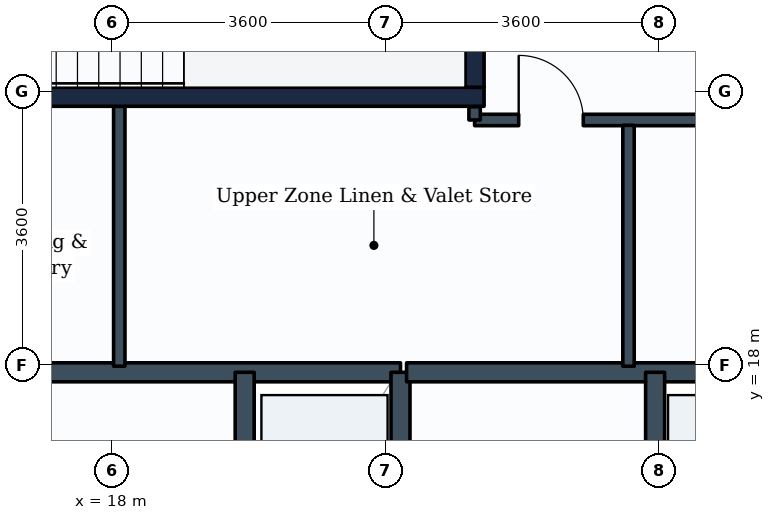
"""IFC4 building model, lengths in metres.
Left out: names, types, materials, properties, quantities, classifications, styles, units other than length and angle.
Written with IfcOpenShell. Run it as: python <this file> out.ifc"""

import sys

from ifc_helpers import new_model, si_unit, direction, frame, frame_2d, origin, place, context, subcontext, project, spatial, rectangle, extrude, element, fill, save


model = new_model("IFC4")
c1 = context("Model", 3, precision=1e-05, world=origin(), true_north=direction((0.0, 1.0)))
c2 = subcontext(c1, "Body", "Model", "MODEL_VIEW")
j1 = project(units=[si_unit("LENGTHUNIT", "METRE"), si_unit("PLANEANGLEUNIT", "RADIAN")], contexts=[c1])
p1 = place(None, origin())
s1 = spatial("IfcSite", under=j1, at=p1, CompositionType="ELEMENT")
p2 = place(p1, origin())
s2 = spatial("IfcBuilding", under=s1, at=p2, CompositionType="ELEMENT")
p3 = place(p2, frame((0.0, 0.0, 217.4)))
s3 = spatial("IfcBuildingStorey", under=s2, at=p3, CompositionType="ELEMENT", Elevation=217.4)
p4 = place(p3, frame((14.65, 21.525, 0.0), z_axis=(0.0, 0.0, 1.0), x_axis=(1.0, 0.0, 0.0)))
e1 = element("IfcWall", 1, at=p4, inside=s3, PredefinedType="SHEAR", context=c2, shape_type="SweptSolid", body=[
    extrude(rectangle(XDim=8.25, YDim=0.25, at=frame_2d((4.125, 0.0))), origin(), (0.0, 0.0, 1.0), 3.28),
])
p5 = place(p3, frame((22.775, 21.65, 0.0), z_axis=(0.0, 0.0, 1.0), x_axis=(0.0, 1.0, 0.0)))
e2 = element("IfcWall", 2, at=p5, inside=s3, PredefinedType="SHEAR", context=c2, shape_type="SweptSolid", body=[
    extrude(rectangle(XDim=2.84, YDim=0.25, at=frame_2d((1.42, 0.0))), origin(), (0.0, 0.0, 1.0), 3.28),
])
p6 = place(p3, frame((14.65, 17.9, 0.0), z_axis=(0.0, 0.0, 1.0), x_axis=(1.0, 0.0, 0.0)))
e3 = element("IfcWall", 3, at=p6, inside=s3, PredefinedType="PARTITIONING", context=c2, shape_type="SweptSolid", body=[
    extrude(rectangle(XDim=7.15, YDim=0.25, at=frame_2d((3.575, 0.0))), origin(), (0.0, 0.0, 1.0), 3.265),
])
p7 = place(p3, frame((19.75, 14.84, 0.0), z_axis=(0.0, 0.0, 1.0), x_axis=(0.0, 1.0, 0.0)))
e4 = element("IfcWall", 4, at=p7, inside=s3, PredefinedType="PARTITIONING", context=c2, shape_type="SweptSolid", body=[
    extrude(rectangle(XDim=3.06, YDim=0.25, at=frame_2d((1.53, 0.0))), origin(), (0.0, 0.0, 1.0), 3.265),
])
p8 = place(p7, frame((0.98, 0.0, 0.0)))
e5 = element("IfcOpeningElement", 5, at=p8, cuts=e4, PredefinedType="OPENING", context=c2, shape_type="SweptSolid", body=[
    extrude(rectangle(XDim=1.1, YDim=2.1, at=frame_2d((0.55, 1.05))), frame((0.0, 0.135, 0.0), z_axis=(0.0, -1.0, 0.0), x_axis=(1.0, 0.0, 0.0)), (0.0, 0.0, 1.0), 0.27),
])
p9 = place(p3, frame((21.8, 14.84, 0.0), z_axis=(0.0, 0.0, 1.0), x_axis=(0.0, 1.0, 0.0)))
e6 = element("IfcWall", 6, at=p9, inside=s3, PredefinedType="PARTITIONING", context=c2, shape_type="SweptSolid", body=[
    extrude(rectangle(XDim=3.06, YDim=0.25, at=frame_2d((1.53, 0.0))), origin(), (0.0, 0.0, 1.0), 3.265),
])
p10 = place(p3, frame((21.88, 17.9, 0.0), z_axis=(0.0, 0.0, 1.0), x_axis=(1.0, 0.0, 0.0)))
e7 = element("IfcWall", 7, at=p10, inside=s3, PredefinedType="PARTITIONING", context=c2, shape_type="SweptSolid", body=[
    extrude(rectangle(XDim=8.52, YDim=0.25, at=frame_2d((4.26, 0.0))), origin(), (0.0, 0.0, 1.0), 3.265),
])
p11 = place(p3, frame((25.15, 14.84, 0.0), z_axis=(0.0, 0.0, 1.0), x_axis=(0.0, 1.0, 0.0)))
e8 = element("IfcWall", 8, at=p11, inside=s3, PredefinedType="PARTITIONING", context=c2, shape_type="SweptSolid", body=[
    extrude(rectangle(XDim=3.06, YDim=0.25, at=frame_2d((1.53, 0.0))), origin(), (0.0, 0.0, 1.0), 3.265),
])
p12 = place(p3, frame((22.775, 21.22, 0.0), z_axis=(0.0, 0.0, 1.0), x_axis=(1.0, 0.0, 0.0)))
e9 = element("IfcWall", 9, at=p12, inside=s3, PredefinedType="PARTITIONING", context=c2, shape_type="SweptSolid", body=[
    extrude(rectangle(XDim=7.545, YDim=0.15, at=frame_2d((3.772, 0.0))), origin(), (0.0, 0.0, 1.0), 3.265),
])
p13 = place(p12, frame((0.58, 0.0, 0.0)))
e10 = element("IfcOpeningElement", 10, at=p13, cuts=e9, PredefinedType="OPENING", context=c2, shape_type="SweptSolid", body=[
    extrude(rectangle(XDim=0.85, YDim=2.1, at=frame_2d((0.425, 1.05))), frame((0.0, 0.085, 0.0), z_axis=(0.0, -1.0, 0.0), x_axis=(1.0, 0.0, 0.0)), (0.0, 0.0, 1.0), 0.17),
])
p14 = place(p12, frame((3.0, 0.0, 0.0)))
e11 = element("IfcOpeningElement", 11, at=p14, cuts=e9, PredefinedType="OPENING", context=c2, shape_type="SweptSolid", body=[
    extrude(rectangle(XDim=0.85, YDim=2.1, at=frame_2d((0.425, 1.05))), frame((0.0, 0.085, 0.0), z_axis=(0.0, -1.0, 0.0), x_axis=(1.0, 0.0, 0.0)), (0.0, 0.0, 1.0), 0.17),
])
p15 = place(p12, frame((5.65, 0.0, 0.0)))
e12 = element("IfcOpeningElement", 12, at=p15, cuts=e9, PredefinedType="OPENING", context=c2, shape_type="SweptSolid", body=[
    extrude(rectangle(XDim=0.85, YDim=2.1, at=frame_2d((0.425, 1.05))), frame((0.0, 0.085, 0.0), z_axis=(0.0, -1.0, 0.0), x_axis=(1.0, 0.0, 0.0)), (0.0, 0.0, 1.0), 0.17),
])
p16 = place(p3, frame((22.775, 21.22, 0.0), z_axis=(0.0, 0.0, 1.0), x_axis=(0.0, 1.0, 0.0)))
e13 = element("IfcWall", 13, at=p16, inside=s3, PredefinedType="PARTITIONING", context=c2, shape_type="SweptSolid", body=[
    extrude(rectangle(XDim=0.175, YDim=0.15, at=frame_2d((0.087, 0.0))), origin(), (0.0, 0.0, 1.0), 3.265),
])
p17 = place(p3, frame((18.1, 17.98, 0.0), z_axis=(0.0, 0.0, 1.0), x_axis=(0.0, 1.0, 0.0)))
e14 = element("IfcWall", 14, at=p17, inside=s3, PredefinedType="PARTITIONING", context=c2, shape_type="SweptSolid", body=[
    extrude(rectangle(XDim=3.42, YDim=0.15, at=frame_2d((1.71, 0.0))), origin(), (0.0, 0.0, 1.0), 3.265),
])
p18 = place(p3, frame((24.8, 17.98, 0.0), z_axis=(0.0, 0.0, 1.0), x_axis=(0.0, 1.0, 0.0)))
e15 = element("IfcWall", 15, at=p18, inside=s3, PredefinedType="PARTITIONING", context=c2, shape_type="SweptSolid", body=[
    extrude(rectangle(XDim=3.17, YDim=0.15, at=frame_2d((1.585, 0.0))), origin(), (0.0, 0.0, 1.0), 3.265),
])
p19 = place(p13, origin())
e16 = element("IfcDoor", 16, at=p19, inside=s3, OperationType="SINGLE_SWING_LEFT", PredefinedType="DOOR", context=c2, shape_type="SweptSolid", body=[
    extrude(rectangle(XDim=0.85, YDim=2.1, at=frame_2d((0.425, 1.05))), frame((0.0, 0.025, 0.0), z_axis=(0.0, -1.0, 0.0), x_axis=(1.0, 0.0, 0.0)), (0.0, 0.0, 1.0), 0.05),
])
fill(e10, e16)
save(model, sys.argv[1])
